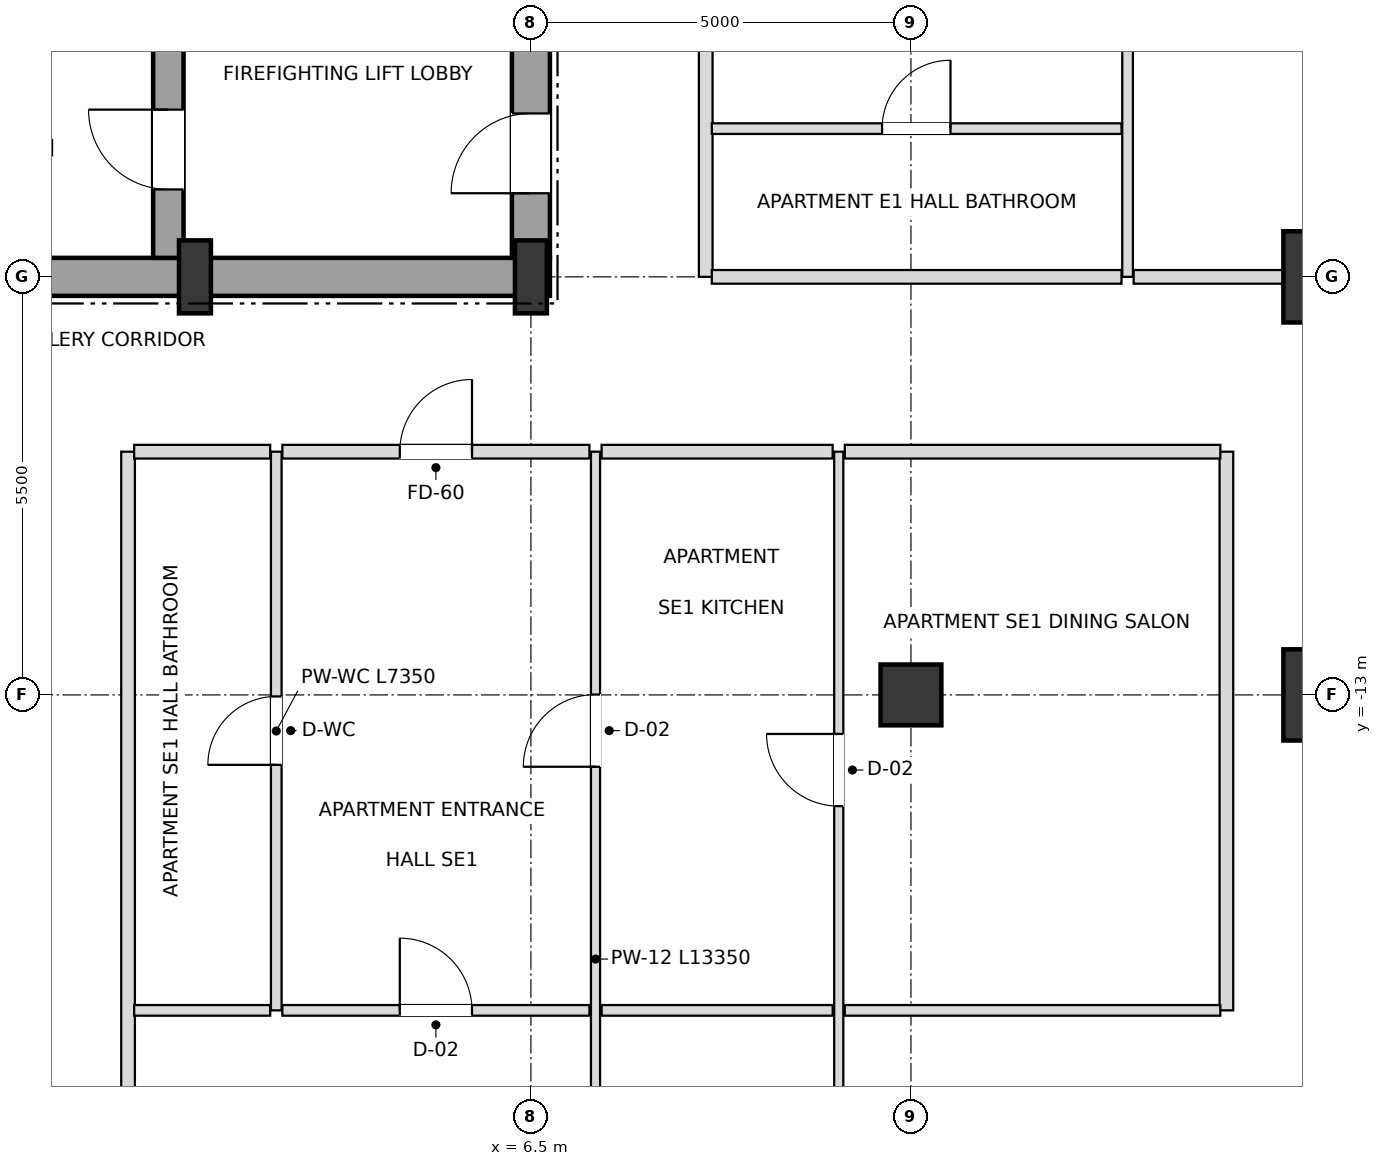
"""IFC4 building model, lengths in metres.
Left out: names, types, materials, properties, quantities, classifications, styles, units other than length and angle.
Written with IfcOpenShell. Run it as: python <this file> out.ifc"""

import sys

from ifc_helpers import new_model, si_unit, direction, frame, frame_2d, origin, origin_2d, place, context, subcontext, project, spatial, rectangle, i_section, extrude, element, fill, save


model = new_model("IFC4")
c1 = context("Model", 3, precision=1e-05, world=origin(), true_north=direction((0.0, 1.0)))
c2 = subcontext(c1, "Body", "Model", "MODEL_VIEW")
j1 = project(units=[si_unit("LENGTHUNIT", "METRE"), si_unit("PLANEANGLEUNIT", "RADIAN")], contexts=[c1])
p1 = place(None, origin())
s1 = spatial("IfcSite", under=j1, at=p1, CompositionType="ELEMENT")
p2 = place(p1, origin())
s2 = spatial("IfcBuilding", under=s1, at=p2, CompositionType="ELEMENT")
p3 = place(p2, frame((0.0, 0.0, 154.8)))
s3 = spatial("IfcBuildingStorey", under=s2, at=p3, CompositionType="ELEMENT", Elevation=154.8)
for number, where, z_axis, x_axis in (
    (1, (2.08, -7.5, 0.0), (0.0, 0.0, 1.0), (1.0, 0.0, 0.0)),
    (2, (6.5, -7.5, 0.0), (0.0, 0.0, 1.0), (1.0, 0.0, 0.0)),
):
    element("IfcColumn", number, at=place(p3, frame(where, z_axis=z_axis, x_axis=x_axis)), inside=s3, PredefinedType="COLUMN", context=c2, shape_type="SweptSolid", body=[
        extrude(i_section(OverallWidth=0.42, OverallDepth=0.96, WebThickness=0.022, FlangeThickness=0.034, at=origin_2d()), origin(), (0.0, 0.0, 1.0), 3.6),
    ])
for number, where, z_axis, x_axis in (
    (3, (17.0, -13.0, 0.0), (0.0, 0.0, 1.0), (1.0, 0.0, 0.0)),
    (4, (17.0, -7.5, 0.0), (0.0, 0.0, 1.0), (1.0, 0.0, 0.0)),
):
    element("IfcColumn", number, at=place(p3, frame(where, z_axis=z_axis, x_axis=x_axis)), inside=s3, PredefinedType="USERDEFINED", context=c2, shape_type="SweptSolid", body=[
        extrude(rectangle(XDim=1.2, YDim=1.2, at=origin_2d()), origin(), (0.0, 0.0, 1.0), 3.6),
    ])
p4 = place(p3, frame((11.5, -13.0, 0.0), z_axis=(0.0, 0.0, 1.0), x_axis=(1.0, 0.0, 0.0)))
e5 = element("IfcColumn", 5, at=p4, inside=s3, PredefinedType="COLUMN", context=c2, shape_type="SweptSolid", body=[
    extrude(rectangle(XDim=0.8, YDim=0.8, at=origin_2d()), origin(), (0.0, 0.0, 1.0), 3.6),
])
p5 = place(p3, frame((0.0, -7.5, 0.0), z_axis=(0.0, 0.0, 1.0), x_axis=(1.0, 0.0, 0.0)))
e6 = element("IfcWall", 6, at=p5, inside=s3, PredefinedType="SHEAR", context=c2, shape_type="SweptSolid", body=[
    extrude(rectangle(XDim=6.75, YDim=0.5, at=frame_2d((3.375, 0.0))), origin(), (0.0, 0.0, 1.0), 3.38),
])
p6 = place(p3, frame((6.5, -7.25, 0.0), z_axis=(0.0, 0.0, 1.0), x_axis=(0.0, 1.0, 0.0)))
e7 = element("IfcWall", 7, at=p6, inside=s3, PredefinedType="SHEAR", context=c2, shape_type="SweptSolid", body=[
    extrude(rectangle(XDim=5.75, YDim=0.5, at=frame_2d((2.875, 0.0))), origin(), (0.0, 0.0, 1.0), 3.38),
])
p7 = place(p6, frame((0.85, 0.0, 0.0)))
e8 = element("IfcOpeningElement", 8, at=p7, cuts=e7, PredefinedType="OPENING", context=c2, shape_type="SweptSolid", body=[
    extrude(rectangle(XDim=1.05, YDim=2.15, at=frame_2d((0.525, 1.075))), frame((0.0, 0.26, 0.0), z_axis=(0.0, -1.0, 0.0), x_axis=(1.0, 0.0, 0.0)), (0.0, 0.0, 1.0), 0.52),
])
p8 = place(p3, frame((1.73, -7.25, 0.0), z_axis=(0.0, 0.0, 1.0), x_axis=(0.0, 1.0, 0.0)))
e9 = element("IfcWall", 9, at=p8, inside=s3, PredefinedType="SHEAR", context=c2, shape_type="SweptSolid", body=[
    extrude(rectangle(XDim=3.3, YDim=0.4, at=frame_2d((1.65, 0.0))), origin(), (0.0, 0.0, 1.0), 3.38),
])
p9 = place(p8, frame((0.9, 0.0, 0.0)))
e10 = element("IfcOpeningElement", 10, at=p9, cuts=e9, PredefinedType="OPENING", context=c2, shape_type="SweptSolid", body=[
    extrude(rectangle(XDim=1.05, YDim=2.15, at=frame_2d((0.525, 1.075))), frame((0.0, 0.21, 0.0), z_axis=(0.0, -1.0, 0.0), x_axis=(1.0, 0.0, 0.0)), (0.0, 0.0, 1.0), 0.42),
])
p10 = place(p3, frame((1.2, -23.15, 0.0), z_axis=(0.0, 0.0, 1.0), x_axis=(0.0, 1.0, 0.0)))
e11 = element("IfcWall", 11, at=p10, inside=s3, PredefinedType="PARTITIONING", context=c2, shape_type="SweptSolid", body=[
    extrude(rectangle(XDim=13.35, YDim=0.18, at=frame_2d((6.675, 0.0))), origin(), (0.0, 0.0, 1.0), 2.816),
])
p11 = place(p3, frame((3.15, -17.15, 0.0), z_axis=(0.0, 0.0, 1.0), x_axis=(0.0, 1.0, 0.0)))
e12 = element("IfcWall", 12, at=p11, inside=s3, PredefinedType="PARTITIONING", context=c2, shape_type="SweptSolid", body=[
    extrude(rectangle(XDim=7.35, YDim=0.14, at=frame_2d((3.675, 0.0))), origin(), (0.0, 0.0, 1.0), 3.38),
])
p12 = place(p11, frame((3.23, 0.0, 0.0)))
e13 = element("IfcOpeningElement", 13, at=p12, cuts=e12, PredefinedType="OPENING", context=c2, shape_type="SweptSolid", body=[
    extrude(rectangle(XDim=0.9, YDim=2.1, at=frame_2d((0.45, 1.05))), frame((0.0, 0.08, 0.0), z_axis=(0.0, -1.0, 0.0), x_axis=(1.0, 0.0, 0.0)), (0.0, 0.0, 1.0), 0.16),
])
p13 = place(p3, frame((7.35, -23.15, 0.0), z_axis=(0.0, 0.0, 1.0), x_axis=(0.0, 1.0, 0.0)))
e14 = element("IfcWall", 14, at=p13, inside=s3, PredefinedType="PARTITIONING", context=c2, shape_type="SweptSolid", body=[
    extrude(rectangle(XDim=13.35, YDim=0.12, at=frame_2d((6.675, 0.0))), origin(), (0.0, 0.0, 1.0), 2.816),
])
p14 = place(p13, frame((9.205, 0.0, 0.0)))
e15 = element("IfcOpeningElement", 15, at=p14, cuts=e14, PredefinedType="OPENING", context=c2, shape_type="SweptSolid", body=[
    extrude(rectangle(XDim=0.95, YDim=2.1, at=frame_2d((0.475, 1.05))), frame((0.0, 0.07, 0.0), z_axis=(0.0, -1.0, 0.0), x_axis=(1.0, 0.0, 0.0)), (0.0, 0.0, 1.0), 0.14),
])
p15 = place(p13, frame((1.399, 0.0, 0.0)))
e16 = element("IfcOpeningElement", 16, at=p15, cuts=e14, PredefinedType="OPENING", context=c2, shape_type="SweptSolid", body=[
    extrude(rectangle(XDim=0.9, YDim=2.1, at=frame_2d((0.45, 1.05))), frame((0.0, 0.07, 0.0), z_axis=(0.0, -1.0, 0.0), x_axis=(1.0, 0.0, 0.0)), (0.0, 0.0, 1.0), 0.14),
])
p16 = place(p3, frame((8.8, -7.5, 0.0), z_axis=(0.0, 0.0, 1.0), x_axis=(0.0, 1.0, 0.0)))
e17 = element("IfcWall", 17, at=p16, inside=s3, PredefinedType="PARTITIONING", context=c2, shape_type="SweptSolid", body=[
    extrude(rectangle(XDim=15.0, YDim=0.18, at=frame_2d((7.5, 0.0))), origin(), (0.0, 0.0, 1.0), 3.38),
])
p17 = place(p16, frame((3.475, 0.0, 0.0)))
e18 = element("IfcOpeningElement", 18, at=p17, cuts=e17, PredefinedType="OPENING", context=c2, shape_type="SweptSolid", body=[
    extrude(rectangle(XDim=0.95, YDim=2.15, at=frame_2d((0.475, 1.075))), frame((0.0, 0.1, 0.0), z_axis=(0.0, -1.0, 0.0), x_axis=(1.0, 0.0, 0.0)), (0.0, 0.0, 1.0), 0.2),
])
p18 = place(p3, frame((10.55, -23.15, 0.0), z_axis=(0.0, 0.0, 1.0), x_axis=(0.0, 1.0, 0.0)))
e19 = element("IfcWall", 19, at=p18, inside=s3, PredefinedType="PARTITIONING", context=c2, shape_type="SweptSolid", body=[
    extrude(rectangle(XDim=13.35, YDim=0.12, at=frame_2d((6.675, 0.0))), origin(), (0.0, 0.0, 1.0), 2.816),
])
p19 = place(p18, frame((8.687, 0.0, 0.0)))
e20 = element("IfcOpeningElement", 20, at=p19, cuts=e19, PredefinedType="OPENING", context=c2, shape_type="SweptSolid", body=[
    extrude(rectangle(XDim=0.95, YDim=2.1, at=frame_2d((0.475, 1.05))), frame((0.0, 0.07, 0.0), z_axis=(0.0, -1.0, 0.0), x_axis=(1.0, 0.0, 0.0)), (0.0, 0.0, 1.0), 0.14),
])
p20 = place(p18, frame((1.399, 0.0, 0.0)))
e21 = element("IfcOpeningElement", 21, at=p20, cuts=e19, PredefinedType="OPENING", context=c2, shape_type="SweptSolid", body=[
    extrude(rectangle(XDim=0.9, YDim=2.1, at=frame_2d((0.45, 1.05))), frame((0.0, 0.07, 0.0), z_axis=(0.0, -1.0, 0.0), x_axis=(1.0, 0.0, 0.0)), (0.0, 0.0, 1.0), 0.14),
])
p21 = place(p3, frame((14.35, -7.5, 0.0), z_axis=(0.0, 0.0, 1.0), x_axis=(0.0, 1.0, 0.0)))
e22 = element("IfcWall", 22, at=p21, inside=s3, PredefinedType="PARTITIONING", context=c2, shape_type="SweptSolid", body=[
    extrude(rectangle(XDim=15.0, YDim=0.14, at=frame_2d((7.5, 0.0))), origin(), (0.0, 0.0, 1.0), 3.38),
])
p22 = place(p21, frame((3.475, 0.0, 0.0)))
e23 = element("IfcOpeningElement", 23, at=p22, cuts=e22, PredefinedType="OPENING", context=c2, shape_type="SweptSolid", body=[
    extrude(rectangle(XDim=0.95, YDim=2.1, at=frame_2d((0.475, 1.05))), frame((0.0, 0.08, 0.0), z_axis=(0.0, -1.0, 0.0), x_axis=(1.0, 0.0, 0.0)), (0.0, 0.0, 1.0), 0.16),
])
p23 = place(p3, frame((15.65, -17.15, 0.0), z_axis=(0.0, 0.0, 1.0), x_axis=(0.0, 1.0, 0.0)))
e24 = element("IfcWall", 24, at=p23, inside=s3, PredefinedType="PARTITIONING", context=c2, shape_type="SweptSolid", body=[
    extrude(rectangle(XDim=7.35, YDim=0.18, at=frame_2d((3.675, 0.0))), origin(), (0.0, 0.0, 1.0), 2.736),
])
p24 = place(p3, frame((1.28, -17.15, 0.0), z_axis=(0.0, 0.0, 1.0), x_axis=(1.0, 0.0, 0.0)))
e25 = element("IfcWall", 25, at=p24, inside=s3, PredefinedType="PARTITIONING", context=c2, shape_type="SweptSolid", body=[
    extrude(rectangle(XDim=1.79, YDim=0.14, at=frame_2d((0.895, 0.0))), origin(), (0.0, 0.0, 1.0), 3.38),
])
p25 = place(p3, frame((3.23, -17.15, 0.0), z_axis=(0.0, 0.0, 1.0), x_axis=(1.0, 0.0, 0.0)))
e26 = element("IfcWall", 26, at=p25, inside=s3, PredefinedType="PARTITIONING", context=c2, shape_type="SweptSolid", body=[
    extrude(rectangle(XDim=4.04, YDim=0.14, at=frame_2d((2.02, 0.0))), origin(), (0.0, 0.0, 1.0), 2.816),
])
p26 = place(p25, frame((1.545, 0.0, 0.0)))
e27 = element("IfcOpeningElement", 27, at=p26, cuts=e26, PredefinedType="OPENING", context=c2, shape_type="SweptSolid", body=[
    extrude(rectangle(XDim=0.95, YDim=2.1, at=frame_2d((0.475, 1.05))), frame((0.0, 0.08, 0.0), z_axis=(0.0, -1.0, 0.0), x_axis=(1.0, 0.0, 0.0)), (0.0, 0.0, 1.0), 0.16),
])
p27 = place(p3, frame((7.43, -17.15, 0.0), z_axis=(0.0, 0.0, 1.0), x_axis=(1.0, 0.0, 0.0)))
e28 = element("IfcWall", 28, at=p27, inside=s3, PredefinedType="PARTITIONING", context=c2, shape_type="SweptSolid", body=[
    extrude(rectangle(XDim=3.04, YDim=0.14, at=frame_2d((1.52, 0.0))), origin(), (0.0, 0.0, 1.0), 3.38),
])
p28 = place(p3, frame((10.63, -17.15, 0.0), z_axis=(0.0, 0.0, 1.0), x_axis=(1.0, 0.0, 0.0)))
e29 = element("IfcWall", 29, at=p28, inside=s3, PredefinedType="PARTITIONING", context=c2, shape_type="SweptSolid", body=[
    extrude(rectangle(XDim=4.94, YDim=0.14, at=frame_2d((2.47, 0.0))), origin(), (0.0, 0.0, 1.0), 2.736),
])
p29 = place(p3, frame((1.28, -9.8, 0.0), z_axis=(0.0, 0.0, 1.0), x_axis=(1.0, 0.0, 0.0)))
e30 = element("IfcWall", 30, at=p29, inside=s3, PredefinedType="PARTITIONING", context=c2, shape_type="SweptSolid", body=[
    extrude(rectangle(XDim=1.79, YDim=0.18, at=frame_2d((0.895, 0.0))), origin(), (0.0, 0.0, 1.0), 3.38),
])
p30 = place(p3, frame((3.23, -9.8, 0.0), z_axis=(0.0, 0.0, 1.0), x_axis=(1.0, 0.0, 0.0)))
e31 = element("IfcWall", 31, at=p30, inside=s3, PredefinedType="PARTITIONING", context=c2, shape_type="SweptSolid", body=[
    extrude(rectangle(XDim=4.04, YDim=0.18, at=frame_2d((2.02, 0.0))), origin(), (0.0, 0.0, 1.0), 2.816),
])
p31 = place(p30, frame((1.545, 0.0, 0.0)))
e32 = element("IfcOpeningElement", 32, at=p31, cuts=e31, PredefinedType="OPENING", context=c2, shape_type="SweptSolid", body=[
    extrude(rectangle(XDim=0.95, YDim=2.15, at=frame_2d((0.475, 1.075))), frame((0.0, 0.1, 0.0), z_axis=(0.0, -1.0, 0.0), x_axis=(1.0, 0.0, 0.0)), (0.0, 0.0, 1.0), 0.2),
])
p32 = place(p3, frame((7.43, -9.8, 0.0), z_axis=(0.0, 0.0, 1.0), x_axis=(1.0, 0.0, 0.0)))
e33 = element("IfcWall", 33, at=p32, inside=s3, PredefinedType="PARTITIONING", context=c2, shape_type="SweptSolid", body=[
    extrude(rectangle(XDim=3.04, YDim=0.18, at=frame_2d((1.52, 0.0))), origin(), (0.0, 0.0, 1.0), 3.38),
])
p33 = place(p3, frame((10.63, -9.8, 0.0), z_axis=(0.0, 0.0, 1.0), x_axis=(1.0, 0.0, 0.0)))
e34 = element("IfcWall", 34, at=p33, inside=s3, PredefinedType="PARTITIONING", context=c2, shape_type="SweptSolid", body=[
    extrude(rectangle(XDim=4.94, YDim=0.18, at=frame_2d((2.47, 0.0))), origin(), (0.0, 0.0, 1.0), 3.38),
])
p34 = place(p3, frame((8.88, -7.5, 0.0), z_axis=(0.0, 0.0, 1.0), x_axis=(1.0, 0.0, 0.0)))
e35 = element("IfcWall", 35, at=p34, inside=s3, PredefinedType="PARTITIONING", context=c2, shape_type="SweptSolid", body=[
    extrude(rectangle(XDim=5.39, YDim=0.18, at=frame_2d((2.695, 0.0))), origin(), (0.0, 0.0, 1.0), 2.816),
])
p35 = place(p3, frame((14.43, -7.5, 0.0), z_axis=(0.0, 0.0, 1.0), x_axis=(1.0, 0.0, 0.0)))
e36 = element("IfcWall", 36, at=p35, inside=s3, PredefinedType="PARTITIONING", context=c2, shape_type="SweptSolid", body=[
    extrude(rectangle(XDim=5.72, YDim=0.18, at=frame_2d((2.86, 0.0))), origin(), (0.0, 0.0, 1.0), 2.816),
])
p36 = place(p3, frame((8.88, -5.55, 0.0), z_axis=(0.0, 0.0, 1.0), x_axis=(1.0, 0.0, 0.0)))
e37 = element("IfcWall", 37, at=p36, inside=s3, PredefinedType="PARTITIONING", context=c2, shape_type="SweptSolid", body=[
    extrude(rectangle(XDim=5.39, YDim=0.14, at=frame_2d((2.695, 0.0))), origin(), (0.0, 0.0, 1.0), 3.38),
])
p37 = place(p36, frame((2.24, 0.0, 0.0)))
e38 = element("IfcOpeningElement", 38, at=p37, cuts=e37, PredefinedType="OPENING", context=c2, shape_type="SweptSolid", body=[
    extrude(rectangle(XDim=0.9, YDim=2.1, at=frame_2d((0.45, 1.05))), frame((0.0, 0.08, 0.0), z_axis=(0.0, -1.0, 0.0), x_axis=(1.0, 0.0, 0.0)), (0.0, 0.0, 1.0), 0.16),
])
p38 = place(p7, origin())
e39 = element("IfcDoor", 39, at=p38, inside=s3, OperationType="SINGLE_SWING_LEFT", PredefinedType="DOOR", context=c2, shape_type="SweptSolid", body=[
    extrude(rectangle(XDim=1.05, YDim=2.15, at=frame_2d((0.525, 1.075))), frame((0.0, 0.025, 0.0), z_axis=(0.0, -1.0, 0.0), x_axis=(1.0, 0.0, 0.0)), (0.0, 0.0, 1.0), 0.05),
])
fill(e8, e39)
p39 = place(p9, origin())
e40 = element("IfcDoor", 40, at=p39, inside=s3, OperationType="SINGLE_SWING_RIGHT", PredefinedType="DOOR", context=c2, shape_type="SweptSolid", body=[
    extrude(rectangle(XDim=1.05, YDim=2.15, at=frame_2d((0.525, 1.075))), frame((0.0, 0.025, 0.0), z_axis=(0.0, -1.0, 0.0), x_axis=(1.0, 0.0, 0.0)), (0.0, 0.0, 1.0), 0.05),
])
fill(e10, e40)
p40 = place(p12, origin())
e41 = element("IfcDoor", 41, at=p40, inside=s3, OperationType="SINGLE_SWING_LEFT", PredefinedType="DOOR", context=c2, shape_type="SweptSolid", body=[
    extrude(rectangle(XDim=0.9, YDim=2.1, at=frame_2d((0.45, 1.05))), frame((0.0, 0.025, 0.0), z_axis=(0.0, -1.0, 0.0), x_axis=(1.0, 0.0, 0.0)), (0.0, 0.0, 1.0), 0.05),
])
fill(e13, e41)
p41 = place(p31, origin())
e42 = element("IfcDoor", 42, at=p41, inside=s3, OperationType="SINGLE_SWING_RIGHT", PredefinedType="DOOR", context=c2, shape_type="SweptSolid", body=[
    extrude(rectangle(XDim=0.95, YDim=2.15, at=frame_2d((0.475, 1.075))), frame((0.0, 0.025, 0.0), z_axis=(0.0, -1.0, 0.0), x_axis=(1.0, 0.0, 0.0)), (0.0, 0.0, 1.0), 0.05),
])
fill(e32, e42)
p42 = place(p14, origin())
e43 = element("IfcDoor", 43, at=p42, inside=s3, OperationType="SINGLE_SWING_LEFT", PredefinedType="DOOR", context=c2, shape_type="SweptSolid", body=[
    extrude(rectangle(XDim=0.95, YDim=2.1, at=frame_2d((0.475, 1.05))), frame((0.0, 0.025, 0.0), z_axis=(0.0, -1.0, 0.0), x_axis=(1.0, 0.0, 0.0)), (0.0, 0.0, 1.0), 0.05),
])
fill(e15, e43)
p43 = place(p19, origin())
e44 = element("IfcDoor", 44, at=p43, inside=s3, OperationType="SINGLE_SWING_RIGHT", PredefinedType="DOOR", context=c2, shape_type="SweptSolid", body=[
    extrude(rectangle(XDim=0.95, YDim=2.1, at=frame_2d((0.475, 1.05))), frame((0.0, 0.025, 0.0), z_axis=(0.0, -1.0, 0.0), x_axis=(1.0, 0.0, 0.0)), (0.0, 0.0, 1.0), 0.05),
])
fill(e20, e44)
p44 = place(p26, origin())
e45 = element("IfcDoor", 45, at=p44, inside=s3, OperationType="SINGLE_SWING_LEFT", PredefinedType="DOOR", context=c2, shape_type="SweptSolid", body=[
    extrude(rectangle(XDim=0.95, YDim=2.1, at=frame_2d((0.475, 1.05))), frame((0.0, 0.025, 0.0), z_axis=(0.0, -1.0, 0.0), x_axis=(1.0, 0.0, 0.0)), (0.0, 0.0, 1.0), 0.05),
])
fill(e27, e45)
p45 = place(p37, origin())
e46 = element("IfcDoor", 46, at=p45, inside=s3, OperationType="SINGLE_SWING_RIGHT", PredefinedType="DOOR", context=c2, shape_type="SweptSolid", body=[
    extrude(rectangle(XDim=0.9, YDim=2.1, at=frame_2d((0.45, 1.05))), frame((0.0, 0.025, 0.0), z_axis=(0.0, -1.0, 0.0), x_axis=(1.0, 0.0, 0.0)), (0.0, 0.0, 1.0), 0.05),
])
fill(e38, e46)
save(model, sys.argv[1])
